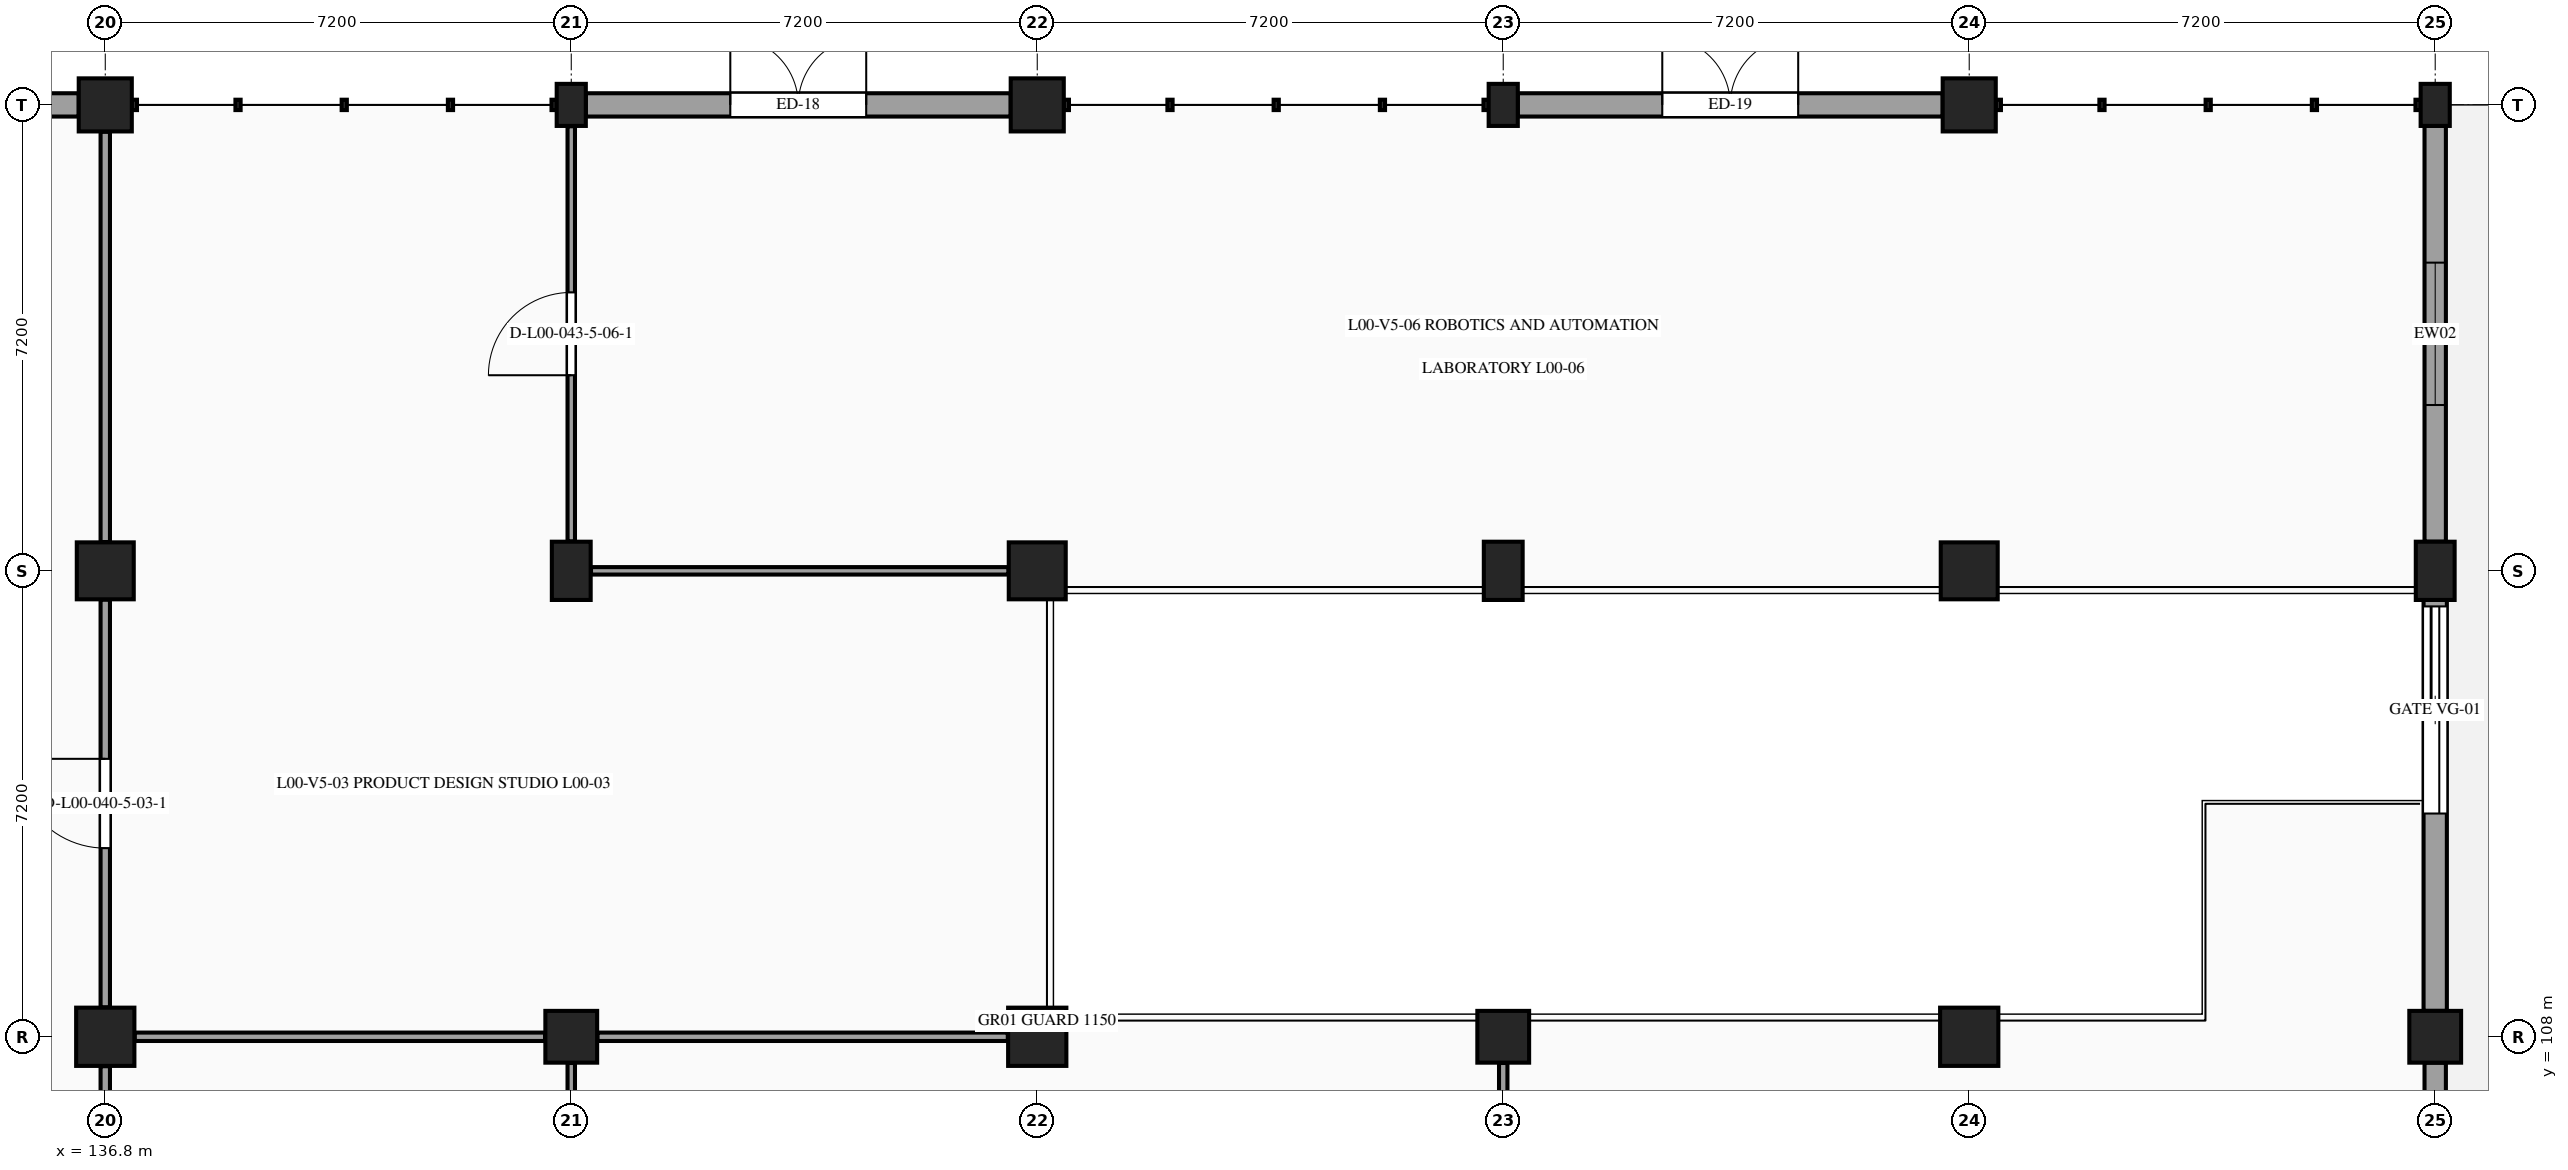
"""IFC4 building model, lengths in metres.
Left out: names, types, materials, properties, quantities, classifications, styles, units other than length and angle.
Written with IfcOpenShell. Run it as: python <this file> out.ifc"""

import sys

from ifc_helpers import new_model, si_unit, direction, frame, frame_2d, origin, origin_2d, place, context, subcontext, project, spatial, rectangle, extrude, element, fill, save


model = new_model("IFC4")
c1 = context("Model", 3, precision=1e-05, world=origin(), true_north=direction((0.0, 1.0)))
c2 = subcontext(c1, "Body", "Model", "MODEL_VIEW")
j1 = project(units=[si_unit("LENGTHUNIT", "METRE"), si_unit("PLANEANGLEUNIT", "RADIAN")], contexts=[c1])
p1 = place(None, origin())
s1 = spatial("IfcSite", under=j1, at=p1, CompositionType="ELEMENT")
p2 = place(p1, origin())
s2 = spatial("IfcBuilding", under=s1, at=p2, CompositionType="ELEMENT")
p3 = place(p2, origin())
s3 = spatial("IfcBuildingStorey", under=s2, at=p3, CompositionType="ELEMENT", Elevation=0.0)
p4 = place(p3, frame((136.8, 108.0, 0.0), z_axis=(0.0, 0.0, 1.0), x_axis=(1.0, 0.0, 0.0)))
e1 = element("IfcColumn", 1, at=p4, inside=s3, PredefinedType="COLUMN", context=c2, shape_type="SweptSolid", body=[
    extrude(rectangle(XDim=0.9, YDim=0.9, at=origin_2d()), origin(), (0.0, 0.0, 1.0), 5.4),
])
p5 = place(p3, frame((136.8, 115.2, 0.0), z_axis=(0.0, 0.0, 1.0), x_axis=(1.0, 0.0, 0.0)))
e2 = element("IfcColumn", 2, at=p5, inside=s3, PredefinedType="COLUMN", context=c2, shape_type="SweptSolid", body=[
    extrude(rectangle(XDim=0.88, YDim=0.88, at=origin_2d()), origin(), (0.0, 0.0, 1.0), 5.4),
])
p6 = place(p3, frame((136.8, 122.4, 0.0), z_axis=(0.0, 0.0, 1.0), x_axis=(1.0, 0.0, 0.0)))
e3 = element("IfcColumn", 3, at=p6, inside=s3, PredefinedType="COLUMN", context=c2, shape_type="SweptSolid", body=[
    extrude(rectangle(XDim=0.82, YDim=0.82, at=origin_2d()), origin(), (0.0, 0.0, 1.0), 5.4),
])
p7 = place(p3, frame((144.0, 108.0, 0.0), z_axis=(0.0, 0.0, 1.0), x_axis=(1.0, 0.0, 0.0)))
e4 = element("IfcColumn", 4, at=p7, inside=s3, PredefinedType="COLUMN", context=c2, shape_type="SweptSolid", body=[
    extrude(rectangle(XDim=0.8, YDim=0.8, at=origin_2d()), origin(), (0.0, 0.0, 1.0), 5.4),
])
p8 = place(p3, frame((144.0, 115.2, 0.0), z_axis=(0.0, 0.0, 1.0), x_axis=(1.0, 0.0, 0.0)))
e5 = element("IfcColumn", 5, at=p8, inside=s3, PredefinedType="COLUMN", context=c2, shape_type="SweptSolid", body=[
    extrude(rectangle(XDim=0.6, YDim=0.9, at=origin_2d()), origin(), (0.0, 0.0, 1.0), 5.4),
])
p9 = place(p3, frame((144.0, 122.4, 0.0), z_axis=(0.0, 0.0, 1.0), x_axis=(1.0, 0.0, 0.0)))
e6 = element("IfcColumn", 6, at=p9, inside=s3, PredefinedType="PILASTER", context=c2, shape_type="SweptSolid", body=[
    extrude(rectangle(XDim=0.45, YDim=0.65, at=origin_2d()), origin(), (0.0, 0.0, 1.0), 5.4),
])
p10 = place(p3, frame((151.2, 108.0, 0.0), z_axis=(0.0, 0.0, 1.0), x_axis=(1.0, 0.0, 0.0)))
e7 = element("IfcColumn", 7, at=p10, inside=s3, PredefinedType="COLUMN", context=c2, shape_type="SweptSolid", body=[
    extrude(rectangle(XDim=0.9, YDim=0.9, at=origin_2d()), origin(), (0.0, 0.0, 1.0), 5.4),
])
p11 = place(p3, frame((151.2, 115.2, 0.0), z_axis=(0.0, 0.0, 1.0), x_axis=(1.0, 0.0, 0.0)))
e8 = element("IfcColumn", 8, at=p11, inside=s3, PredefinedType="COLUMN", context=c2, shape_type="SweptSolid", body=[
    extrude(rectangle(XDim=0.88, YDim=0.88, at=origin_2d()), origin(), (0.0, 0.0, 1.0), 5.4),
])
p12 = place(p3, frame((151.2, 122.4, 0.0), z_axis=(0.0, 0.0, 1.0), x_axis=(1.0, 0.0, 0.0)))
e9 = element("IfcColumn", 9, at=p12, inside=s3, PredefinedType="COLUMN", context=c2, shape_type="SweptSolid", body=[
    extrude(rectangle(XDim=0.82, YDim=0.82, at=origin_2d()), origin(), (0.0, 0.0, 1.0), 5.4),
])
p13 = place(p3, frame((158.4, 108.0, 0.0), z_axis=(0.0, 0.0, 1.0), x_axis=(1.0, 0.0, 0.0)))
e10 = element("IfcColumn", 10, at=p13, inside=s3, PredefinedType="COLUMN", context=c2, shape_type="SweptSolid", body=[
    extrude(rectangle(XDim=0.8, YDim=0.8, at=origin_2d()), origin(), (0.0, 0.0, 1.0), 5.4),
])
p14 = place(p3, frame((158.4, 115.2, 0.0), z_axis=(0.0, 0.0, 1.0), x_axis=(1.0, 0.0, 0.0)))
e11 = element("IfcColumn", 11, at=p14, inside=s3, PredefinedType="COLUMN", context=c2, shape_type="SweptSolid", body=[
    extrude(rectangle(XDim=0.6, YDim=0.9, at=origin_2d()), origin(), (0.0, 0.0, 1.0), 5.4),
])
p15 = place(p3, frame((158.4, 122.4, 0.0), z_axis=(0.0, 0.0, 1.0), x_axis=(1.0, 0.0, 0.0)))
e12 = element("IfcColumn", 12, at=p15, inside=s3, PredefinedType="PILASTER", context=c2, shape_type="SweptSolid", body=[
    extrude(rectangle(XDim=0.45, YDim=0.65, at=origin_2d()), origin(), (0.0, 0.0, 1.0), 5.4),
])
p16 = place(p3, frame((165.6, 108.0, 0.0), z_axis=(0.0, 0.0, 1.0), x_axis=(1.0, 0.0, 0.0)))
e13 = element("IfcColumn", 13, at=p16, inside=s3, PredefinedType="COLUMN", context=c2, shape_type="SweptSolid", body=[
    extrude(rectangle(XDim=0.9, YDim=0.9, at=origin_2d()), origin(), (0.0, 0.0, 1.0), 5.4),
])
p17 = place(p3, frame((165.6, 115.2, 0.0), z_axis=(0.0, 0.0, 1.0), x_axis=(1.0, 0.0, 0.0)))
e14 = element("IfcColumn", 14, at=p17, inside=s3, PredefinedType="COLUMN", context=c2, shape_type="SweptSolid", body=[
    extrude(rectangle(XDim=0.88, YDim=0.88, at=origin_2d()), origin(), (0.0, 0.0, 1.0), 5.4),
])
p18 = place(p3, frame((165.6, 122.4, 0.0), z_axis=(0.0, 0.0, 1.0), x_axis=(1.0, 0.0, 0.0)))
e15 = element("IfcColumn", 15, at=p18, inside=s3, PredefinedType="COLUMN", context=c2, shape_type="SweptSolid", body=[
    extrude(rectangle(XDim=0.82, YDim=0.82, at=origin_2d()), origin(), (0.0, 0.0, 1.0), 5.4),
])
p19 = place(p3, frame((172.8, 108.0, 0.0), z_axis=(0.0, 0.0, 1.0), x_axis=(1.0, 0.0, 0.0)))
e16 = element("IfcColumn", 16, at=p19, inside=s3, PredefinedType="COLUMN", context=c2, shape_type="SweptSolid", body=[
    extrude(rectangle(XDim=0.8, YDim=0.8, at=origin_2d()), origin(), (0.0, 0.0, 1.0), 5.4),
])
p20 = place(p3, frame((172.8, 115.2, 0.0), z_axis=(0.0, 0.0, 1.0), x_axis=(1.0, 0.0, 0.0)))
e17 = element("IfcColumn", 17, at=p20, inside=s3, PredefinedType="COLUMN", context=c2, shape_type="SweptSolid", body=[
    extrude(rectangle(XDim=0.6, YDim=0.9, at=origin_2d()), origin(), (0.0, 0.0, 1.0), 5.4),
])
p21 = place(p3, frame((172.8, 122.4, 0.0), z_axis=(0.0, 0.0, 1.0), x_axis=(1.0, 0.0, 0.0)))
e18 = element("IfcColumn", 18, at=p21, inside=s3, PredefinedType="PILASTER", context=c2, shape_type="SweptSolid", body=[
    extrude(rectangle(XDim=0.45, YDim=0.65, at=origin_2d()), origin(), (0.0, 0.0, 1.0), 5.4),
])
p22 = place(p3, frame((129.825, 122.4, 0.0), z_axis=(0.0, 0.0, 1.0), x_axis=(1.0, 0.0, 0.0)))
e19 = element("IfcWall", 19, at=p22, inside=s3, PredefinedType="STANDARD", context=c2, shape_type="SweptSolid", body=[
    extrude(rectangle(XDim=6.565, YDim=0.36, at=frame_2d((3.282, 0.0))), origin(), (0.0, 0.0, 1.0), 4.37),
])
p23 = place(p22, frame((2.232, 0.0, 0.0)))
e20 = element("IfcOpeningElement", 20, at=p23, cuts=e19, PredefinedType="OPENING", context=c2, shape_type="SweptSolid", body=[
    extrude(rectangle(XDim=2.1, YDim=2.4, at=frame_2d((1.05, 1.2))), frame((0.0, 0.19, 0.0), z_axis=(0.0, -1.0, 0.0), x_axis=(1.0, 0.0, 0.0)), (0.0, 0.0, 1.0), 0.38),
])
p24 = place(p3, frame((144.225, 122.4, 0.0), z_axis=(0.0, 0.0, 1.0), x_axis=(1.0, 0.0, 0.0)))
e21 = element("IfcWall", 21, at=p24, inside=s3, PredefinedType="STANDARD", context=c2, shape_type="SweptSolid", body=[
    extrude(rectangle(XDim=6.565, YDim=0.36, at=frame_2d((3.282, 0.0))), origin(), (0.0, 0.0, 1.0), 4.37),
])
p25 = place(p24, frame((2.232, 0.0, 0.0)))
e22 = element("IfcOpeningElement", 22, at=p25, cuts=e21, PredefinedType="OPENING", context=c2, shape_type="SweptSolid", body=[
    extrude(rectangle(XDim=2.1, YDim=2.4, at=frame_2d((1.05, 1.2))), frame((0.0, 0.19, 0.0), z_axis=(0.0, -1.0, 0.0), x_axis=(1.0, 0.0, 0.0)), (0.0, 0.0, 1.0), 0.38),
])
p26 = place(p3, frame((158.625, 122.4, 0.0), z_axis=(0.0, 0.0, 1.0), x_axis=(1.0, 0.0, 0.0)))
e23 = element("IfcWall", 23, at=p26, inside=s3, PredefinedType="STANDARD", context=c2, shape_type="SweptSolid", body=[
    extrude(rectangle(XDim=6.565, YDim=0.36, at=frame_2d((3.282, 0.0))), origin(), (0.0, 0.0, 1.0), 4.37),
])
p27 = place(p26, frame((2.232, 0.0, 0.0)))
e24 = element("IfcOpeningElement", 24, at=p27, cuts=e23, PredefinedType="OPENING", context=c2, shape_type="SweptSolid", body=[
    extrude(rectangle(XDim=2.1, YDim=2.4, at=frame_2d((1.05, 1.2))), frame((0.0, 0.19, 0.0), z_axis=(0.0, -1.0, 0.0), x_axis=(1.0, 0.0, 0.0)), (0.0, 0.0, 1.0), 0.38),
])
p28 = place(p3, frame((172.8, 122.075, 0.0), z_axis=(0.0, 0.0, 1.0), x_axis=(0.0, -1.0, 0.0)))
e25 = element("IfcWall", 25, at=p28, inside=s3, PredefinedType="STANDARD", context=c2, shape_type="SweptSolid", body=[
    extrude(rectangle(XDim=6.425, YDim=0.33, at=frame_2d((3.212, 0.0))), origin(), (0.0, 0.0, 1.0), 4.335),
])
p29 = place(p28, frame((2.113, 0.0, 0.98)))
e26 = element("IfcOpeningElement", 26, at=p29, cuts=e25, PredefinedType="OPENING", context=c2, shape_type="SweptSolid", body=[
    extrude(rectangle(XDim=2.2, YDim=1.45, at=frame_2d((1.1, 0.725))), frame((0.0, 0.175, 0.0), z_axis=(0.0, -1.0, 0.0), x_axis=(1.0, 0.0, 0.0)), (0.0, 0.0, 1.0), 0.35),
])
p30 = place(p3, frame((172.8, 114.75, 0.0), z_axis=(0.0, 0.0, 1.0), x_axis=(0.0, -1.0, 0.0)))
e27 = element("IfcWall", 27, at=p30, inside=s3, PredefinedType="STANDARD", context=c2, shape_type="SweptSolid", body=[
    extrude(rectangle(XDim=6.35, YDim=0.36, at=frame_2d((3.175, 0.0))), origin(), (0.0, 0.0, 1.0), 4.335),
])
p31 = place(p30, frame((0.1, 0.0, 0.0)))
e28 = element("IfcOpeningElement", 28, at=p31, cuts=e27, PredefinedType="OPENING", context=c2, shape_type="SweptSolid", body=[
    extrude(rectangle(XDim=3.2, YDim=3.2, at=frame_2d((1.6, 1.6))), frame((0.0, 0.19, 0.0), z_axis=(0.0, -1.0, 0.0), x_axis=(1.0, 0.0, 0.0)), (0.0, 0.0, 1.0), 0.38),
])
p32 = place(p3, frame((172.8, 107.6, 0.0), z_axis=(0.0, 0.0, 1.0), x_axis=(0.0, -1.0, 0.0)))
e29 = element("IfcWall", 29, at=p32, inside=s3, PredefinedType="STANDARD", context=c2, shape_type="SweptSolid", body=[
    extrude(rectangle(XDim=6.39, YDim=0.33, at=frame_2d((3.195, 0.0))), origin(), (0.0, 0.0, 1.0), 4.335),
])
p33 = place(p32, frame((0.995, 0.0, 0.98)))
e30 = element("IfcOpeningElement", 30, at=p33, cuts=e29, PredefinedType="OPENING", context=c2, shape_type="SweptSolid", body=[
    extrude(rectangle(XDim=4.4, YDim=1.65, at=frame_2d((2.2, 0.825))), frame((0.0, 0.175, 0.0), z_axis=(0.0, -1.0, 0.0), x_axis=(1.0, 0.0, 0.0)), (0.0, 0.0, 1.0), 0.35),
])
p34 = place(p3, frame((136.8, 101.13, 0.0), z_axis=(0.0, 0.0, 1.0), x_axis=(0.0, 1.0, 0.0)))
e31 = element("IfcWall", 31, at=p34, inside=s3, PredefinedType="PARTITIONING", context=c2, shape_type="SweptSolid", body=[
    extrude(rectangle(XDim=6.415, YDim=0.145, at=frame_2d((3.208, 0.0))), origin(), (0.0, 0.0, 1.0), 4.455),
])
p35 = place(p3, frame((136.8, 108.455, 0.0), z_axis=(0.0, 0.0, 1.0), x_axis=(0.0, 1.0, 0.0)))
e32 = element("IfcWall", 32, at=p35, inside=s3, PredefinedType="PARTITIONING", context=c2, shape_type="SweptSolid", body=[
    extrude(rectangle(XDim=6.3, YDim=0.145, at=frame_2d((3.15, 0.0))), origin(), (0.0, 0.0, 1.0), 4.405),
])
p36 = place(p35, frame((2.46, 0.0, 0.0)))
e33 = element("IfcOpeningElement", 33, at=p36, cuts=e32, PredefinedType="OPENING", context=c2, shape_type="SweptSolid", body=[
    extrude(rectangle(XDim=1.38, YDim=2.22, at=frame_2d((0.69, 1.11))), frame((0.0, 0.083, 0.0), z_axis=(0.0, -1.0, 0.0), x_axis=(1.0, 0.0, 0.0)), (0.0, 0.0, 1.0), 0.165),
])
p37 = place(p3, frame((136.8, 115.645, 0.0), z_axis=(0.0, 0.0, 1.0), x_axis=(0.0, 1.0, 0.0)))
e34 = element("IfcWall", 34, at=p37, inside=s3, PredefinedType="PARTITIONING", context=c2, shape_type="SweptSolid", body=[
    extrude(rectangle(XDim=6.34, YDim=0.145, at=frame_2d((3.17, 0.0))), origin(), (0.0, 0.0, 1.0), 4.405),
])
p38 = place(p3, frame((144.0, 101.215, 0.0), z_axis=(0.0, 0.0, 1.0), x_axis=(0.0, 1.0, 0.0)))
e35 = element("IfcWall", 35, at=p38, inside=s3, PredefinedType="PARTITIONING", context=c2, shape_type="SweptSolid", body=[
    extrude(rectangle(XDim=6.38, YDim=0.115, at=frame_2d((3.19, 0.0))), origin(), (0.0, 0.0, 1.0), 4.455),
])
p39 = place(p38, frame((2.45, 0.0, 0.0)))
e36 = element("IfcOpeningElement", 36, at=p39, cuts=e35, PredefinedType="OPENING", context=c2, shape_type="SweptSolid", body=[
    extrude(rectangle(XDim=1.48, YDim=2.28, at=frame_2d((0.74, 1.14))), frame((0.0, 0.067, 0.0), z_axis=(0.0, -1.0, 0.0), x_axis=(1.0, 0.0, 0.0)), (0.0, 0.0, 1.0), 0.135),
])
p40 = place(p3, frame((137.255, 108.0, 0.0), z_axis=(0.0, 0.0, 1.0), x_axis=(1.0, 0.0, 0.0)))
e37 = element("IfcWall", 37, at=p40, inside=s3, PredefinedType="PARTITIONING", context=c2, shape_type="SweptSolid", body=[
    extrude(rectangle(XDim=6.34, YDim=0.13, at=frame_2d((3.17, 0.0))), origin(), (0.0, 0.0, 1.0), 4.29),
])
p41 = place(p3, frame((144.0, 115.655, 0.0), z_axis=(0.0, 0.0, 1.0), x_axis=(0.0, 1.0, 0.0)))
e38 = element("IfcWall", 38, at=p41, inside=s3, PredefinedType="PARTITIONING", context=c2, shape_type="SweptSolid", body=[
    extrude(rectangle(XDim=6.415, YDim=0.115, at=frame_2d((3.208, 0.0))), origin(), (0.0, 0.0, 1.0), 4.405),
])
p42 = place(p41, frame((2.567, 0.0, 0.0)))
e39 = element("IfcOpeningElement", 39, at=p42, cuts=e38, PredefinedType="OPENING", context=c2, shape_type="SweptSolid", body=[
    extrude(rectangle(XDim=1.28, YDim=2.24, at=frame_2d((0.64, 1.12))), frame((0.0, 0.067, 0.0), z_axis=(0.0, -1.0, 0.0), x_axis=(1.0, 0.0, 0.0)), (0.0, 0.0, 1.0), 0.135),
])
p43 = place(p3, frame((144.405, 108.0, 0.0), z_axis=(0.0, 0.0, 1.0), x_axis=(1.0, 0.0, 0.0)))
e40 = element("IfcWall", 40, at=p43, inside=s3, PredefinedType="PARTITIONING", context=c2, shape_type="SweptSolid", body=[
    extrude(rectangle(XDim=6.34, YDim=0.13, at=frame_2d((3.17, 0.0))), origin(), (0.0, 0.0, 1.0), 4.31),
])
p44 = place(p3, frame((144.305, 115.2, 0.0), z_axis=(0.0, 0.0, 1.0), x_axis=(1.0, 0.0, 0.0)))
e41 = element("IfcWall", 41, at=p44, inside=s3, PredefinedType="PARTITIONING", context=c2, shape_type="SweptSolid", body=[
    extrude(rectangle(XDim=6.45, YDim=0.115, at=frame_2d((3.225, 0.0))), origin(), (0.0, 0.0, 1.0), 4.31),
])
p45 = place(p3, frame((158.4, 101.215, 0.0), z_axis=(0.0, 0.0, 1.0), x_axis=(0.0, 1.0, 0.0)))
e42 = element("IfcWall", 42, at=p45, inside=s3, PredefinedType="PARTITIONING", context=c2, shape_type="SweptSolid", body=[
    extrude(rectangle(XDim=6.38, YDim=0.13, at=frame_2d((3.19, 0.0))), origin(), (0.0, 0.0, 1.0), 4.455),
])
p46 = place(p45, frame((2.31, 0.0, 0.0)))
e43 = element("IfcOpeningElement", 43, at=p46, cuts=e42, PredefinedType="OPENING", context=c2, shape_type="SweptSolid", body=[
    extrude(rectangle(XDim=1.76, YDim=2.3, at=frame_2d((0.88, 1.15))), frame((0.0, 0.075, 0.0), z_axis=(0.0, -1.0, 0.0), x_axis=(1.0, 0.0, 0.0)), (0.0, 0.0, 1.0), 0.15),
])
p47 = place(p25, origin())
e44 = element("IfcDoor", 44, at=p47, inside=s3, OperationType="DOUBLE_DOOR_SINGLE_SWING", PredefinedType="DOOR", context=c2, shape_type="SweptSolid", body=[
    extrude(rectangle(XDim=2.1, YDim=2.4, at=frame_2d((1.05, 1.2))), frame((0.0, 0.025, 0.0), z_axis=(0.0, -1.0, 0.0), x_axis=(1.0, 0.0, 0.0)), (0.0, 0.0, 1.0), 0.05),
])
fill(e22, e44)
p48 = place(p27, origin())
e45 = element("IfcDoor", 45, at=p48, inside=s3, OperationType="DOUBLE_DOOR_SINGLE_SWING", PredefinedType="DOOR", context=c2, shape_type="SweptSolid", body=[
    extrude(rectangle(XDim=2.1, YDim=2.4, at=frame_2d((1.05, 1.2))), frame((0.0, 0.025, 0.0), z_axis=(0.0, -1.0, 0.0), x_axis=(1.0, 0.0, 0.0)), (0.0, 0.0, 1.0), 0.05),
])
fill(e24, e45)
p49 = place(p29, origin())
e46 = element("IfcWindow", 46, at=p49, inside=s3, PartitioningType="SINGLE_PANEL", PredefinedType="WINDOW", context=c2, shape_type="SweptSolid", body=[
    extrude(rectangle(XDim=2.2, YDim=1.45, at=frame_2d((1.1, 0.725))), frame((0.0, -0.03, 0.0), z_axis=(0.0, -1.0, 0.0), x_axis=(1.0, 0.0, 0.0)), (0.0, 0.0, 1.0), 0.06),
])
fill(e26, e46)
p50 = place(p31, origin())
e47 = element("IfcDoor", 47, at=p50, inside=s3, OperationType="ROLLINGUP", PredefinedType="GATE", context=c2, shape_type="SweptSolid", body=[
    extrude(rectangle(XDim=3.2, YDim=3.2, at=frame_2d((1.6, 1.6))), frame((0.0, 0.025, 0.0), z_axis=(0.0, -1.0, 0.0), x_axis=(1.0, 0.0, 0.0)), (0.0, 0.0, 1.0), 0.05),
])
fill(e28, e47)
p51 = place(p36, origin())
e48 = element("IfcDoor", 48, at=p51, inside=s3, OperationType="SINGLE_SWING_RIGHT", PredefinedType="DOOR", context=c2, shape_type="SweptSolid", body=[
    extrude(rectangle(XDim=1.38, YDim=2.22, at=frame_2d((0.69, 1.11))), frame((0.0, 0.025, 0.0), z_axis=(0.0, -1.0, 0.0), x_axis=(1.0, 0.0, 0.0)), (0.0, 0.0, 1.0), 0.05),
])
fill(e33, e48)
p52 = place(p42, origin())
e49 = element("IfcDoor", 49, at=p52, inside=s3, OperationType="SINGLE_SWING_LEFT", PredefinedType="DOOR", context=c2, shape_type="SweptSolid", body=[
    extrude(rectangle(XDim=1.28, YDim=2.24, at=frame_2d((0.64, 1.12))), frame((0.0, 0.025, 0.0), z_axis=(0.0, -1.0, 0.0), x_axis=(1.0, 0.0, 0.0)), (0.0, 0.0, 1.0), 0.05),
])
fill(e39, e49)
save(model, sys.argv[1])
